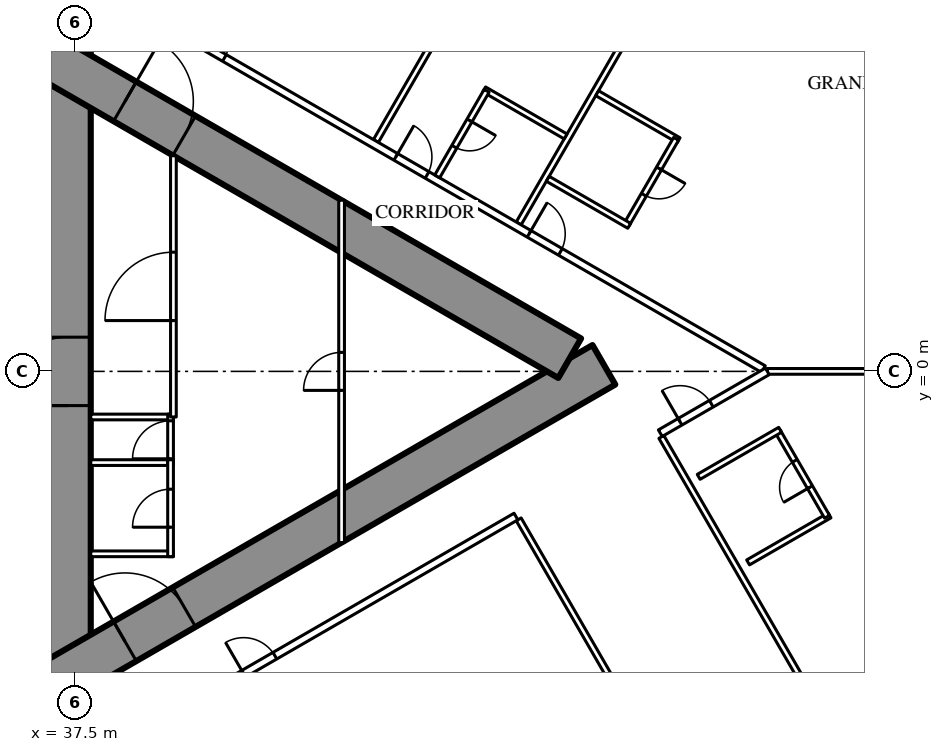
"""IFC4 building model, lengths in metres.
Left out: names, types, materials, properties, quantities, classifications, styles, units other than length and angle.
Written with IfcOpenShell. Run it as: python <this file> out.ifc"""

import sys

from ifc_helpers import new_model, si_unit, direction, frame, frame_2d, origin, place, context, subcontext, project, spatial, rectangle, extrude, element, fill, save


model = new_model("IFC4")
c1 = context("Model", 3, precision=1e-05, world=origin(), true_north=direction((0.0, 1.0)))
c2 = subcontext(c1, "Body", "Model", "MODEL_VIEW")
j1 = project(units=[si_unit("LENGTHUNIT", "METRE"), si_unit("PLANEANGLEUNIT", "RADIAN")], contexts=[c1])
p1 = place(None, origin())
s1 = spatial("IfcSite", under=j1, at=p1, CompositionType="ELEMENT")
p2 = place(p1, origin())
s2 = spatial("IfcBuilding", under=s1, at=p2, CompositionType="ELEMENT")
p3 = place(p2, frame((0.0, 0.0, 60.0)))
s3 = spatial("IfcBuildingStorey", under=s2, at=p3, CompositionType="ELEMENT", Elevation=60.0)
p4 = place(p3, frame((37.3, -8.6, 0.0), z_axis=(0.0, 0.0, 1.0), x_axis=(0.0, 1.0, 0.0)))
e1 = element("IfcWall", 1, at=p4, inside=s3, PredefinedType="SHEAR", context=c2, shape_type="SweptSolid", body=[
    extrude(rectangle(XDim=17.2, YDim=1.2, at=frame_2d((8.6, 0.0))), origin(), (0.0, 0.0, 1.0), 3.5),
])
p5 = place(p4, frame((7.7, 0.0, 0.0)))
e2 = element("IfcOpeningElement", 2, at=p5, cuts=e1, PredefinedType="OPENING", context=c2, shape_type="SweptSolid", body=[
    extrude(rectangle(XDim=1.8, YDim=2.2, at=frame_2d((0.9, 1.1))), frame((0.0, 0.61, 0.0), z_axis=(0.0, -1.0, 0.0), x_axis=(1.0, 0.0, 0.0)), (0.0, 0.0, 1.0), 1.22),
])
p6 = place(p3, frame((27.2, -13.8, 0.0), z_axis=(0.0, 0.0, 1.0), x_axis=(0.866027159892, 0.499996958321, 0.0)))
e3 = element("IfcWall", 3, at=p6, inside=s3, PredefinedType="SHEAR", context=c2, shape_type="SweptSolid", body=[
    extrude(rectangle(XDim=27.947, YDim=1.2, at=frame_2d((13.973, 0.0))), origin(), (0.0, 0.0, 1.0), 3.5),
])
p7 = place(p6, frame((4.6, 0.0, 0.0)))
e4 = element("IfcOpeningElement", 4, at=p7, cuts=e3, PredefinedType="OPENING", context=c2, shape_type="SweptSolid", body=[
    extrude(rectangle(XDim=1.0, YDim=2.2, at=frame_2d((0.5, 1.1))), frame((0.0, 0.61, 0.0), z_axis=(0.0, -1.0, 0.0), x_axis=(1.0, 0.0, 0.0)), (0.0, 0.0, 1.0), 1.22),
])
p8 = place(p6, frame((13.395, 0.0, 0.0)))
e5 = element("IfcOpeningElement", 5, at=p8, cuts=e3, PredefinedType="OPENING", context=c2, shape_type="SweptSolid", body=[
    extrude(rectangle(XDim=1.8, YDim=2.2, at=frame_2d((0.9, 1.1))), frame((0.0, 0.61, 0.0), z_axis=(0.0, -1.0, 0.0), x_axis=(1.0, 0.0, 0.0)), (0.0, 0.0, 1.0), 1.22),
])
p9 = place(p3, frame((27.2, 13.8, 0.0), z_axis=(0.0, 0.0, 1.0), x_axis=(0.866024515034, -0.500001539357, 0.0)))
e6 = element("IfcWall", 6, at=p9, inside=s3, PredefinedType="SHEAR", context=c2, shape_type="SweptSolid", body=[
    extrude(rectangle(XDim=26.907, YDim=1.2, at=frame_2d((13.454, 0.0))), origin(), (0.0, 0.0, 1.0), 3.5),
])
p10 = place(p9, frame((4.6, 0.0, 0.0)))
e7 = element("IfcOpeningElement", 7, at=p10, cuts=e6, PredefinedType="OPENING", context=c2, shape_type="SweptSolid", body=[
    extrude(rectangle(XDim=1.0, YDim=2.2, at=frame_2d((0.5, 1.1))), frame((0.0, 0.61, 0.0), z_axis=(0.0, -1.0, 0.0), x_axis=(1.0, 0.0, 0.0)), (0.0, 0.0, 1.0), 1.22),
])
p11 = place(p9, frame((13.395, 0.0, 0.0)))
e8 = element("IfcOpeningElement", 8, at=p11, cuts=e6, PredefinedType="OPENING", context=c2, shape_type="SweptSolid", body=[
    extrude(rectangle(XDim=1.8, YDim=2.2, at=frame_2d((0.9, 1.1))), frame((0.0, 0.61, 0.0), z_axis=(0.0, -1.0, 0.0), x_axis=(1.0, 0.0, 0.0)), (0.0, 0.0, 1.0), 1.22),
])
p12 = place(p3, frame((49.159, -3.893, 0.0), z_axis=(0.0, 0.0, 1.0), x_axis=(0.499998773722, -0.866026111775, 0.0)))
e9 = element("IfcWall", 9, at=p12, inside=s3, PredefinedType="PARTITIONING", context=c2, shape_type="SweptSolid", body=[
    extrude(rectangle(XDim=9.892, YDim=0.15, at=frame_2d((4.946, 0.0))), origin(), (0.0, 0.0, 1.0), 2.25),
])
p13 = place(p3, frame((52.915, -1.725, 0.0), z_axis=(0.0, 0.0, 1.0), x_axis=(0.499997163113, -0.866027041656, 0.0)))
e10 = element("IfcWall", 10, at=p13, inside=s3, PredefinedType="PARTITIONING", context=c2, shape_type="SweptSolid", body=[
    extrude(rectangle(XDim=12.591, YDim=0.15, at=frame_2d((6.295, 0.0))), origin(), (0.0, 0.0, 1.0), 3.25),
])
p14 = place(p3, frame((45.403, 6.062, 0.0), z_axis=(0.0, 0.0, 1.0), x_axis=(0.500013434677, 0.866017647131, 0.0)))
e11 = element("IfcWall", 11, at=p14, inside=s3, PredefinedType="PARTITIONING", context=c2, shape_type="SweptSolid", body=[
    extrude(rectangle(XDim=9.902, YDim=0.15, at=frame_2d((4.951, 0.0))), origin(), (0.0, 0.0, 1.0), 2.25),
])
p15 = place(p3, frame((49.159, 3.893, 0.0), z_axis=(0.0, 0.0, 1.0), x_axis=(0.499995664361, 0.866027906952, 0.0)))
e12 = element("IfcWall", 12, at=p15, inside=s3, PredefinedType="PARTITIONING", context=c2, shape_type="SweptSolid", body=[
    extrude(rectangle(XDim=12.711, YDim=0.15, at=frame_2d((6.356, 0.0))), origin(), (0.0, 0.0, 1.0), 3.25),
])
p16 = place(p3, frame((55.702, 0.0, 0.0), z_axis=(0.0, 0.0, 1.0), x_axis=(1.0, 0.0, 0.0)))
e13 = element("IfcWall", 13, at=p16, inside=s3, PredefinedType="PARTITIONING", context=c2, shape_type="SweptSolid", body=[
    extrude(rectangle(XDim=16.117, YDim=0.15, at=frame_2d((8.059, 0.0))), origin(), (0.0, 0.0, 1.0), 2.25),
])
p17 = place(p3, frame((36.834, 10.894, 0.0), z_axis=(0.0, 0.0, 1.0), x_axis=(0.866028157229, -0.499995230863, 0.0)))
e14 = element("IfcWall", 14, at=p17, inside=s3, PredefinedType="PARTITIONING", context=c2, shape_type="SweptSolid", body=[
    extrude(rectangle(XDim=21.667, YDim=0.2, at=frame_2d((10.833, 0.0))), origin(), (0.0, 0.0, 1.0), 3.25),
])
p18 = place(p17, frame((14.55, 0.0, 0.0)))
e15 = element("IfcOpeningElement", 15, at=p18, cuts=e14, PredefinedType="OPENING", context=c2, shape_type="SweptSolid", body=[
    extrude(rectangle(XDim=0.95, YDim=2.2, at=frame_2d((0.475, 1.1))), frame((0.0, 0.11, 0.0), z_axis=(0.0, -1.0, 0.0), x_axis=(1.0, 0.0, 0.0)), (0.0, 0.0, 1.0), 0.22),
])
p19 = place(p17, frame((10.5, 0.0, 0.0)))
e16 = element("IfcOpeningElement", 16, at=p19, cuts=e14, PredefinedType="OPENING", context=c2, shape_type="SweptSolid", body=[
    extrude(rectangle(XDim=0.95, YDim=2.2, at=frame_2d((0.475, 1.1))), frame((0.0, 0.11, 0.0), z_axis=(0.0, -1.0, 0.0), x_axis=(1.0, 0.0, 0.0)), (0.0, 0.0, 1.0), 0.22),
])
p20 = place(p17, frame((4.292, 0.0, 0.0)))
e17 = element("IfcOpeningElement", 17, at=p20, cuts=e14, PredefinedType="OPENING", context=c2, shape_type="SweptSolid", body=[
    extrude(rectangle(XDim=1.0, YDim=2.2, at=frame_2d((0.5, 1.1))), frame((0.0, 0.11, 0.0), z_axis=(0.0, -1.0, 0.0), x_axis=(1.0, 0.0, 0.0)), (0.0, 0.0, 1.0), 0.22),
])
p21 = place(p17, frame((0.246, 0.0, 0.0)))
e18 = element("IfcOpeningElement", 18, at=p21, cuts=e14, PredefinedType="OPENING", context=c2, shape_type="SweptSolid", body=[
    extrude(rectangle(XDim=0.9, YDim=2.2, at=frame_2d((0.45, 1.1))), frame((0.0, 0.11, 0.0), z_axis=(0.0, -1.0, 0.0), x_axis=(1.0, 0.0, 0.0)), (0.0, 0.0, 1.0), 0.22),
])
p22 = place(p3, frame((37.96, -10.243, 0.0), z_axis=(0.0, 0.0, 1.0), x_axis=(0.866030548046, 0.499991089772, 0.0)))
e19 = element("IfcWall", 19, at=p22, inside=s3, PredefinedType="PARTITIONING", context=c2, shape_type="SweptSolid", body=[
    extrude(rectangle(XDim=12.849, YDim=0.2, at=frame_2d((6.425, 0.0))), origin(), (0.0, 0.0, 1.0), 3.25),
])
p23 = place(p22, frame((4.575, 0.0, 0.0)))
e20 = element("IfcOpeningElement", 20, at=p23, cuts=e19, PredefinedType="OPENING", context=c2, shape_type="SweptSolid", body=[
    extrude(rectangle(XDim=0.95, YDim=2.2, at=frame_2d((0.475, 1.1))), frame((0.0, 0.11, 0.0), z_axis=(0.0, -1.0, 0.0), x_axis=(1.0, 0.0, 0.0)), (0.0, 0.0, 1.0), 0.22),
])
p24 = place(p22, frame((0.6, 0.0, 0.0)))
e21 = element("IfcOpeningElement", 21, at=p24, cuts=e19, PredefinedType="OPENING", context=c2, shape_type="SweptSolid", body=[
    extrude(rectangle(XDim=0.95, YDim=2.2, at=frame_2d((0.475, 1.1))), frame((0.0, 0.11, 0.0), z_axis=(0.0, -1.0, 0.0), x_axis=(1.0, 0.0, 0.0)), (0.0, 0.0, 1.0), 0.22),
])
p25 = place(p3, frame((52.886, -1.626, 0.0), z_axis=(0.0, 0.0, 1.0), x_axis=(0.866030540913, 0.499991102127, 0.0)))
e22 = element("IfcWall", 22, at=p25, inside=s3, PredefinedType="PARTITIONING", context=c2, shape_type="SweptSolid", body=[
    extrude(rectangle(XDim=3.251, YDim=0.2, at=frame_2d((1.626, 0.0))), origin(), (0.0, 0.0, 1.0), 3.25),
])
p26 = place(p25, frame((0.6, 0.0, 0.0)))
e23 = element("IfcOpeningElement", 23, at=p26, cuts=e22, PredefinedType="OPENING", context=c2, shape_type="SweptSolid", body=[
    extrude(rectangle(XDim=0.95, YDim=2.2, at=frame_2d((0.475, 1.1))), frame((0.0, 0.11, 0.0), z_axis=(0.0, -1.0, 0.0), x_axis=(1.0, 0.0, 0.0)), (0.0, 0.0, 1.0), 0.22),
])
p27 = place(p3, frame((55.196, -5.026, 0.0), z_axis=(0.0, 0.0, 1.0), x_axis=(0.866073894602, 0.499916002032, 0.0)))
e24 = element("IfcWall", 24, at=p27, inside=s3, PredefinedType="PARTITIONING", context=c2, shape_type="SweptSolid", body=[
    extrude(rectangle(XDim=2.475, YDim=0.15, at=frame_2d((1.238, 0.0))), origin(), (0.0, 0.0, 1.0), 3.25),
])
p28 = place(p3, frame((55.975, -1.575, 0.0), z_axis=(0.0, 0.0, 1.0), x_axis=(0.500006934395, -0.866021400173, 0.0)))
e25 = element("IfcWall", 25, at=p28, inside=s3, PredefinedType="PARTITIONING", context=c2, shape_type="SweptSolid", body=[
    extrude(rectangle(XDim=2.6, YDim=0.15, at=frame_2d((1.3, 0.0))), origin(), (0.0, 0.0, 1.0), 3.25),
])
p29 = place(p28, frame((0.9, 0.0, 0.0)))
e26 = element("IfcOpeningElement", 26, at=p29, cuts=e25, PredefinedType="OPENING", context=c2, shape_type="SweptSolid", body=[
    extrude(rectangle(XDim=0.8, YDim=2.2, at=frame_2d((0.4, 1.1))), frame((0.0, 0.085, 0.0), z_axis=(0.0, -1.0, 0.0), x_axis=(1.0, 0.0, 0.0)), (0.0, 0.0, 1.0), 0.17),
])
p30 = place(p3, frame((53.896, -2.775, 0.0), z_axis=(0.0, 0.0, 1.0), x_axis=(0.866006523861, 0.500032699561, 0.0)))
e27 = element("IfcWall", 27, at=p30, inside=s3, PredefinedType="PARTITIONING", context=c2, shape_type="SweptSolid", body=[
    extrude(rectangle(XDim=2.475, YDim=0.15, at=frame_2d((1.237, 0.0))), origin(), (0.0, 0.0, 1.0), 3.25),
])
p31 = place(p3, frame((51.224, 7.32, 0.0), z_axis=(0.0, 0.0, 1.0), x_axis=(0.866031185235, -0.4999899861, 0.0)))
e28 = element("IfcWall", 28, at=p31, inside=s3, PredefinedType="PARTITIONING", context=c2, shape_type="SweptSolid", body=[
    extrude(rectangle(XDim=2.475, YDim=0.15, at=frame_2d((1.238, 0.0))), origin(), (0.0, 0.0, 1.0), 3.25),
])
p32 = place(p3, frame((52.003, 3.868, 0.0), z_axis=(0.0, 0.0, 1.0), x_axis=(0.500047596559, 0.865997922154, 0.0)))
e29 = element("IfcWall", 29, at=p32, inside=s3, PredefinedType="PARTITIONING", context=c2, shape_type="SweptSolid", body=[
    extrude(rectangle(XDim=2.6, YDim=0.15, at=frame_2d((1.3, 0.0))), origin(), (0.0, 0.0, 1.0), 3.25),
])
p33 = place(p32, frame((0.9, 0.0, 0.0)))
e30 = element("IfcOpeningElement", 30, at=p33, cuts=e29, PredefinedType="OPENING", context=c2, shape_type="SweptSolid", body=[
    extrude(rectangle(XDim=0.8, YDim=2.2, at=frame_2d((0.4, 1.1))), frame((0.0, 0.085, 0.0), z_axis=(0.0, -1.0, 0.0), x_axis=(1.0, 0.0, 0.0)), (0.0, 0.0, 1.0), 0.17),
])
for number, where, z_axis, x_axis in (
    (31, (49.925, 5.068, 0.0), (0.0, 0.0, 1.0), (0.866, -0.5, 0.0)),
    (32, (48.251, 7.42, 0.0), (0.0, 0.0, 1.0), (0.866, -0.5, 0.0)),
):
    element("IfcWall", number, at=place(p3, frame(where, z_axis=z_axis, x_axis=x_axis)), inside=s3, PredefinedType="PARTITIONING", context=c2, shape_type="SweptSolid", body=[
        extrude(rectangle(XDim=2.475, YDim=0.15, at=frame_2d((1.237, 0.0))), origin(), (0.0, 0.0, 1.0), 3.25),
    ])
p34 = place(p3, frame((47.016, 5.13, 0.0), z_axis=(0.0, 0.0, 1.0), x_axis=(0.500006934395, 0.866021400173, 0.0)))
e33 = element("IfcWall", 33, at=p34, inside=s3, PredefinedType="PARTITIONING", context=c2, shape_type="SweptSolid", body=[
    extrude(rectangle(XDim=2.6, YDim=0.15, at=frame_2d((1.3, 0.0))), origin(), (0.0, 0.0, 1.0), 3.25),
])
p35 = place(p34, frame((0.9, 0.0, 0.0)))
e34 = element("IfcOpeningElement", 34, at=p35, cuts=e33, PredefinedType="OPENING", context=c2, shape_type="SweptSolid", body=[
    extrude(rectangle(XDim=0.8, YDim=2.2, at=frame_2d((0.4, 1.1))), frame((0.0, 0.085, 0.0), z_axis=(0.0, -1.0, 0.0), x_axis=(1.0, 0.0, 0.0)), (0.0, 0.0, 1.0), 0.17),
])
for number, where, z_axis, x_axis in (
    (35, (37.9, -1.2, 0.0), (0.0, 0.0, 1.0), (1.0, 0.0, 0.0)),
    (36, (37.9, -2.4, 0.0), (0.0, 0.0, 1.0), (1.0, 0.0, 0.0)),
    (37, (37.9, -4.8, 0.0), (0.0, 0.0, 1.0), (1.0, 0.0, 0.0)),
):
    element("IfcWall", number, at=place(p3, frame(where, z_axis=z_axis, x_axis=x_axis)), inside=s3, PredefinedType="PARTITIONING", context=c2, shape_type="SweptSolid", body=[
        extrude(rectangle(XDim=2.175, YDim=0.15, at=frame_2d((1.087, 0.0))), origin(), (0.0, 0.0, 1.0), 3.25),
    ])
p36 = place(p3, frame((40.0, -2.475, 0.0), z_axis=(0.0, 0.0, 1.0), x_axis=(0.0, 1.0, 0.0)))
e38 = element("IfcWall", 38, at=p36, inside=s3, PredefinedType="PARTITIONING", context=c2, shape_type="SweptSolid", body=[
    extrude(rectangle(XDim=1.35, YDim=0.15, at=frame_2d((0.675, 0.0))), origin(), (0.0, 0.0, 1.0), 3.25),
])
p37 = place(p36, frame((0.175, 0.0, 0.0)))
e39 = element("IfcOpeningElement", 39, at=p37, cuts=e38, PredefinedType="OPENING", context=c2, shape_type="SweptSolid", body=[
    extrude(rectangle(XDim=1.0, YDim=2.2, at=frame_2d((0.5, 1.1))), frame((0.0, 0.085, 0.0), z_axis=(0.0, -1.0, 0.0), x_axis=(1.0, 0.0, 0.0)), (0.0, 0.0, 1.0), 0.17),
])
p38 = place(p3, frame((40.0, -4.875, 0.0), z_axis=(0.0, 0.0, 1.0), x_axis=(0.0, 1.0, 0.0)))
e40 = element("IfcWall", 40, at=p38, inside=s3, PredefinedType="PARTITIONING", context=c2, shape_type="SweptSolid", body=[
    extrude(rectangle(XDim=2.55, YDim=0.15, at=frame_2d((1.275, 0.0))), origin(), (0.0, 0.0, 1.0), 3.25),
])
p39 = place(p38, frame((0.775, 0.0, 0.0)))
e41 = element("IfcOpeningElement", 41, at=p39, cuts=e40, PredefinedType="OPENING", context=c2, shape_type="SweptSolid", body=[
    extrude(rectangle(XDim=1.0, YDim=2.2, at=frame_2d((0.5, 1.1))), frame((0.0, 0.085, 0.0), z_axis=(0.0, -1.0, 0.0), x_axis=(1.0, 0.0, 0.0)), (0.0, 0.0, 1.0), 0.17),
])
p40 = place(p3, frame((40.075, -1.2, 0.0), z_axis=(0.0, 0.0, 1.0), x_axis=(0.0, 1.0, 0.0)))
e42 = element("IfcWall", 42, at=p40, inside=s3, PredefinedType="PARTITIONING", context=c2, shape_type="SweptSolid", body=[
    extrude(rectangle(XDim=6.874, YDim=0.15, at=frame_2d((3.437, 0.0))), origin(), (0.0, 0.0, 1.0), 3.25),
])
p41 = place(p40, frame((2.537, 0.0, 0.0)))
e43 = element("IfcOpeningElement", 43, at=p41, cuts=e42, PredefinedType="OPENING", context=c2, shape_type="SweptSolid", body=[
    extrude(rectangle(XDim=1.8, YDim=2.2, at=frame_2d((0.9, 1.1))), frame((0.0, 0.085, 0.0), z_axis=(0.0, -1.0, 0.0), x_axis=(1.0, 0.0, 0.0)), (0.0, 0.0, 1.0), 0.17),
])
p42 = place(p3, frame((44.5, -4.505, 0.0), z_axis=(0.0, 0.0, 1.0), x_axis=(0.0, 1.0, 0.0)))
e44 = element("IfcWall", 44, at=p42, inside=s3, PredefinedType="PARTITIONING", context=c2, shape_type="SweptSolid", body=[
    extrude(rectangle(XDim=9.009, YDim=0.15, at=frame_2d((4.505, 0.0))), origin(), (0.0, 0.0, 1.0), 2.45),
])
p43 = place(p42, frame((4.005, 0.0, 0.0)))
e45 = element("IfcOpeningElement", 45, at=p43, cuts=e44, PredefinedType="OPENING", context=c2, shape_type="SweptSolid", body=[
    extrude(rectangle(XDim=1.0, YDim=2.2, at=frame_2d((0.5, 1.1))), frame((0.0, 0.085, 0.0), z_axis=(0.0, -1.0, 0.0), x_axis=(1.0, 0.0, 0.0)), (0.0, 0.0, 1.0), 0.17),
])
p44 = place(p23, origin())
e46 = element("IfcDoor", 46, at=p44, inside=s3, OperationType="SINGLE_SWING_LEFT", PredefinedType="DOOR", context=c2, shape_type="SweptSolid", body=[
    extrude(rectangle(XDim=0.95, YDim=2.2, at=frame_2d((0.475, 1.1))), frame((0.0, 0.025, 0.0), z_axis=(0.0, -1.0, 0.0), x_axis=(1.0, 0.0, 0.0)), (0.0, 0.0, 1.0), 0.05),
])
fill(e20, e46)
p45 = place(p29, origin())
e47 = element("IfcDoor", 47, at=p45, inside=s3, OperationType="SINGLE_SWING_RIGHT", PredefinedType="DOOR", context=c2, shape_type="SweptSolid", body=[
    extrude(rectangle(XDim=0.8, YDim=2.2, at=frame_2d((0.4, 1.1))), frame((0.0, 0.025, 0.0), z_axis=(0.0, -1.0, 0.0), x_axis=(1.0, 0.0, 0.0)), (0.0, 0.0, 1.0), 0.05),
])
fill(e26, e47)
p46 = place(p26, origin())
e48 = element("IfcDoor", 48, at=p46, inside=s3, OperationType="SINGLE_SWING_LEFT", PredefinedType="DOOR", context=c2, shape_type="SweptSolid", body=[
    extrude(rectangle(XDim=0.95, YDim=2.2, at=frame_2d((0.475, 1.1))), frame((0.0, 0.025, 0.0), z_axis=(0.0, -1.0, 0.0), x_axis=(1.0, 0.0, 0.0)), (0.0, 0.0, 1.0), 0.05),
])
fill(e23, e48)
p47 = place(p33, origin())
e49 = element("IfcDoor", 49, at=p47, inside=s3, OperationType="SINGLE_SWING_RIGHT", PredefinedType="DOOR", context=c2, shape_type="SweptSolid", body=[
    extrude(rectangle(XDim=0.8, YDim=2.2, at=frame_2d((0.4, 1.1))), frame((0.0, 0.025, 0.0), z_axis=(0.0, -1.0, 0.0), x_axis=(1.0, 0.0, 0.0)), (0.0, 0.0, 1.0), 0.05),
])
fill(e30, e49)
p48 = place(p18, origin())
e50 = element("IfcDoor", 50, at=p48, inside=s3, OperationType="SINGLE_SWING_LEFT", PredefinedType="DOOR", context=c2, shape_type="SweptSolid", body=[
    extrude(rectangle(XDim=0.95, YDim=2.2, at=frame_2d((0.475, 1.1))), frame((0.0, 0.025, 0.0), z_axis=(0.0, -1.0, 0.0), x_axis=(1.0, 0.0, 0.0)), (0.0, 0.0, 1.0), 0.05),
])
fill(e15, e50)
p49 = place(p35, origin())
e51 = element("IfcDoor", 51, at=p49, inside=s3, OperationType="SINGLE_SWING_RIGHT", PredefinedType="DOOR", context=c2, shape_type="SweptSolid", body=[
    extrude(rectangle(XDim=0.8, YDim=2.2, at=frame_2d((0.4, 1.1))), frame((0.0, 0.025, 0.0), z_axis=(0.0, -1.0, 0.0), x_axis=(1.0, 0.0, 0.0)), (0.0, 0.0, 1.0), 0.05),
])
fill(e34, e51)
p50 = place(p19, origin())
e52 = element("IfcDoor", 52, at=p50, inside=s3, OperationType="SINGLE_SWING_LEFT", PredefinedType="DOOR", context=c2, shape_type="SweptSolid", body=[
    extrude(rectangle(XDim=0.95, YDim=2.2, at=frame_2d((0.475, 1.1))), frame((0.0, 0.025, 0.0), z_axis=(0.0, -1.0, 0.0), x_axis=(1.0, 0.0, 0.0)), (0.0, 0.0, 1.0), 0.05),
])
fill(e16, e52)
p51 = place(p20, origin())
e53 = element("IfcDoor", 53, at=p51, inside=s3, OperationType="SINGLE_SWING_LEFT", PredefinedType="DOOR", context=c2, shape_type="SweptSolid", body=[
    extrude(rectangle(XDim=1.0, YDim=2.2, at=frame_2d((0.5, 1.1))), frame((0.0, 0.025, 0.0), z_axis=(0.0, -1.0, 0.0), x_axis=(1.0, 0.0, 0.0)), (0.0, 0.0, 1.0), 0.05),
])
fill(e17, e53)
p52 = place(p37, origin())
e54 = element("IfcDoor", 54, at=p52, inside=s3, OperationType="SINGLE_SWING_LEFT", PredefinedType="DOOR", context=c2, shape_type="SweptSolid", body=[
    extrude(rectangle(XDim=1.0, YDim=2.2, at=frame_2d((0.5, 1.1))), frame((0.0, 0.025, 0.0), z_axis=(0.0, -1.0, 0.0), x_axis=(1.0, 0.0, 0.0)), (0.0, 0.0, 1.0), 0.05),
])
fill(e39, e54)
p53 = place(p39, origin())
e55 = element("IfcDoor", 55, at=p53, inside=s3, OperationType="SINGLE_SWING_LEFT", PredefinedType="DOOR", context=c2, shape_type="SweptSolid", body=[
    extrude(rectangle(XDim=1.0, YDim=2.2, at=frame_2d((0.5, 1.1))), frame((0.0, 0.025, 0.0), z_axis=(0.0, -1.0, 0.0), x_axis=(1.0, 0.0, 0.0)), (0.0, 0.0, 1.0), 0.05),
])
fill(e41, e55)
p54 = place(p41, origin())
e56 = element("IfcDoor", 56, at=p54, inside=s3, OperationType="DOUBLE_DOOR_SINGLE_SWING", PredefinedType="DOOR", context=c2, shape_type="SweptSolid", body=[
    extrude(rectangle(XDim=1.8, YDim=2.2, at=frame_2d((0.9, 1.1))), frame((0.0, 0.025, 0.0), z_axis=(0.0, -1.0, 0.0), x_axis=(1.0, 0.0, 0.0)), (0.0, 0.0, 1.0), 0.05),
])
fill(e43, e56)
p55 = place(p43, origin())
e57 = element("IfcDoor", 57, at=p55, inside=s3, OperationType="SINGLE_SWING_LEFT", PredefinedType="DOOR", context=c2, shape_type="SweptSolid", body=[
    extrude(rectangle(XDim=1.0, YDim=2.2, at=frame_2d((0.5, 1.1))), frame((0.0, 0.025, 0.0), z_axis=(0.0, -1.0, 0.0), x_axis=(1.0, 0.0, 0.0)), (0.0, 0.0, 1.0), 0.05),
])
fill(e45, e57)
p56 = place(p8, origin())
e58 = element("IfcDoor", 58, at=p56, inside=s3, OperationType="DOUBLE_DOOR_SINGLE_SWING", PredefinedType="DOOR", context=c2, shape_type="SweptSolid", body=[
    extrude(rectangle(XDim=1.8, YDim=2.2, at=frame_2d((0.9, 1.1))), frame((0.0, 0.025, 0.0), z_axis=(0.0, -1.0, 0.0), x_axis=(1.0, 0.0, 0.0)), (0.0, 0.0, 1.0), 0.05),
])
fill(e5, e58)
p57 = place(p11, origin())
e59 = element("IfcDoor", 59, at=p57, inside=s3, OperationType="DOUBLE_DOOR_SINGLE_SWING", PredefinedType="DOOR", context=c2, shape_type="SweptSolid", body=[
    extrude(rectangle(XDim=1.8, YDim=2.2, at=frame_2d((0.9, 1.1))), frame((0.0, 0.025, 0.0), z_axis=(0.0, -1.0, 0.0), x_axis=(1.0, 0.0, 0.0)), (0.0, 0.0, 1.0), 0.05),
])
fill(e8, e59)
p58 = place(p5, origin())
e60 = element("IfcDoor", 60, at=p58, inside=s3, OperationType="DOUBLE_DOOR_SINGLE_SWING", PredefinedType="DOOR", context=c2, shape_type="SweptSolid", body=[
    extrude(rectangle(XDim=1.8, YDim=2.2, at=frame_2d((0.9, 1.1))), frame((0.0, 0.025, 0.0), z_axis=(0.0, -1.0, 0.0), x_axis=(1.0, 0.0, 0.0)), (0.0, 0.0, 1.0), 0.05),
])
fill(e2, e60)
save(model, sys.argv[1])
